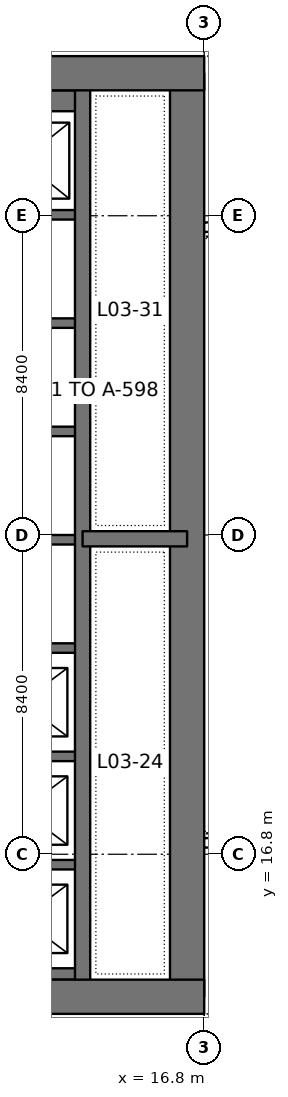
"""IFC4 building model, lengths in metres.
Left out: names, types, materials, properties, quantities, classifications, styles, units other than length and angle.
Written with IfcOpenShell. Run it as: python <this file> out.ifc"""

import sys

from ifc_helpers import new_model, si_unit, direction, frame, frame_2d, origin, place, context, subcontext, project, spatial, rectangle, extrude, element, save


model = new_model("IFC4")
c1 = context("Model", 3, precision=1e-05, world=origin(), true_north=direction((0.0, 1.0)))
c2 = subcontext(c1, "Body", "Model", "MODEL_VIEW")
j1 = project(units=[si_unit("LENGTHUNIT", "METRE"), si_unit("PLANEANGLEUNIT", "RADIAN")], contexts=[c1])
p1 = place(None, origin())
s1 = spatial("IfcSite", under=j1, at=p1, CompositionType="ELEMENT")
p2 = place(p1, origin())
s2 = spatial("IfcBuilding", under=s1, at=p2, CompositionType="ELEMENT")
p3 = place(p2, frame((0.0, 0.0, 14.4)))
s3 = spatial("IfcBuildingStorey", under=s2, at=p3, CompositionType="ELEMENT", Elevation=14.4)
p4 = place(p3, frame((-1.2, 13.05, 0.0), z_axis=(0.0, 0.0, 1.0), x_axis=(1.0, 0.0, 0.0)))
e1 = element("IfcWall", 1, at=p4, inside=s3, PredefinedType="SHEAR", context=c2, shape_type="SweptSolid", body=[
    extrude(rectangle(XDim=18.0, YDim=0.9, at=frame_2d((9.0, 0.0))), origin(), (0.0, 0.0, 1.0), 4.5),
])
p5 = place(p4, frame((8.95, 0.0, 0.0)))
e2 = element("IfcOpeningElement", 2, at=p5, cuts=e1, PredefinedType="OPENING", context=c2, shape_type="SweptSolid", body=[
    extrude(rectangle(XDim=1.8, YDim=2.4, at=frame_2d((0.9, 1.2))), frame((0.0, 0.46, 0.0), z_axis=(0.0, -1.0, 0.0), x_axis=(1.0, 0.0, 0.0)), (0.0, 0.0, 1.0), 0.92),
])
p6 = place(p3, frame((-1.2, 37.35, 0.0), z_axis=(0.0, 0.0, 1.0), x_axis=(1.0, 0.0, 0.0)))
e3 = element("IfcWall", 3, at=p6, inside=s3, PredefinedType="SHEAR", context=c2, shape_type="SweptSolid", body=[
    extrude(rectangle(XDim=18.0, YDim=0.9, at=frame_2d((9.0, 0.0))), origin(), (0.0, 0.0, 1.0), 4.5),
])
p7 = place(p6, frame((8.95, 0.0, 0.0)))
e4 = element("IfcOpeningElement", 4, at=p7, cuts=e3, PredefinedType="OPENING", context=c2, shape_type="SweptSolid", body=[
    extrude(rectangle(XDim=1.8, YDim=2.4, at=frame_2d((0.9, 1.2))), frame((0.0, 0.46, 0.0), z_axis=(0.0, -1.0, 0.0), x_axis=(1.0, 0.0, 0.0)), (0.0, 0.0, 1.0), 0.92),
])
p8 = place(p3, frame((16.35, 13.05, 0.0), z_axis=(0.0, 0.0, 1.0), x_axis=(0.0, 1.0, 0.0)))
e5 = element("IfcWall", 5, at=p8, inside=s3, PredefinedType="SHEAR", context=c2, shape_type="SweptSolid", body=[
    extrude(rectangle(XDim=24.3, YDim=0.9, at=frame_2d((12.15, 0.0))), origin(), (0.0, 0.0, 1.0), 4.5),
])
p9 = place(p3, frame((13.6, 13.05, 0.0), z_axis=(0.0, 0.0, 1.0), x_axis=(0.0, 1.0, 0.0)))
e6 = element("IfcWall", 6, at=p9, inside=s3, PredefinedType="SHEAR", context=c2, shape_type="SweptSolid", body=[
    extrude(rectangle(XDim=24.3, YDim=0.4, at=frame_2d((12.15, 0.0))), origin(), (0.0, 0.0, 1.0), 4.5),
])
p10 = place(p3, frame((13.6, 25.1, 0.0), z_axis=(0.0, 0.0, 1.0), x_axis=(1.0, 0.0, 0.0)))
e7 = element("IfcWall", 7, at=p10, inside=s3, PredefinedType="SHEAR", context=c2, shape_type="SweptSolid", body=[
    extrude(rectangle(XDim=2.75, YDim=0.4, at=frame_2d((1.375, 0.0))), origin(), (0.0, 0.0, 1.0), 4.5),
])
p11 = place(p3, frame((10.4, 13.65, 0.0), z_axis=(0.0, 0.0, 1.0), x_axis=(1.0, 0.0, 0.0)))
e8 = element("IfcWall", 8, at=p11, inside=s3, PredefinedType="SHEAR", context=c2, shape_type="SweptSolid", body=[
    extrude(rectangle(XDim=3.2, YDim=0.3, at=frame_2d((1.6, 0.0))), origin(), (0.0, 0.0, 1.0), 4.5),
])
for number, where, z_axis, x_axis in (
    (9, (10.4, 16.525, 0.0), (0.0, 0.0, 1.0), (1.0, 0.0, 0.0)),
    (10, (10.4, 19.375, 0.0), (0.0, 0.0, 1.0), (1.0, 0.0, 0.0)),
    (11, (10.4, 22.225, 0.0), (0.0, 0.0, 1.0), (1.0, 0.0, 0.0)),
    (12, (10.4, 25.075, 0.0), (0.0, 0.0, 1.0), (1.0, 0.0, 0.0)),
    (13, (10.4, 27.925, 0.0), (0.0, 0.0, 1.0), (1.0, 0.0, 0.0)),
    (14, (10.4, 30.775, 0.0), (0.0, 0.0, 1.0), (1.0, 0.0, 0.0)),
    (15, (10.4, 33.625, 0.0), (0.0, 0.0, 1.0), (1.0, 0.0, 0.0)),
):
    element("IfcWall", number, at=place(p3, frame(where, z_axis=z_axis, x_axis=x_axis)), inside=s3, PredefinedType="SHEAR", context=c2, shape_type="SweptSolid", body=[
        extrude(rectangle(XDim=3.2, YDim=0.25, at=frame_2d((1.6, 0.0))), origin(), (0.0, 0.0, 1.0), 4.5),
    ])
p12 = place(p3, frame((10.4, 36.625, 0.0), z_axis=(0.0, 0.0, 1.0), x_axis=(1.0, 0.0, 0.0)))
e16 = element("IfcWall", 16, at=p12, inside=s3, PredefinedType="SHEAR", context=c2, shape_type="SweptSolid", body=[
    extrude(rectangle(XDim=3.2, YDim=0.55, at=frame_2d((1.6, 0.0))), origin(), (0.0, 0.0, 1.0), 4.5),
])
save(model, sys.argv[1])
